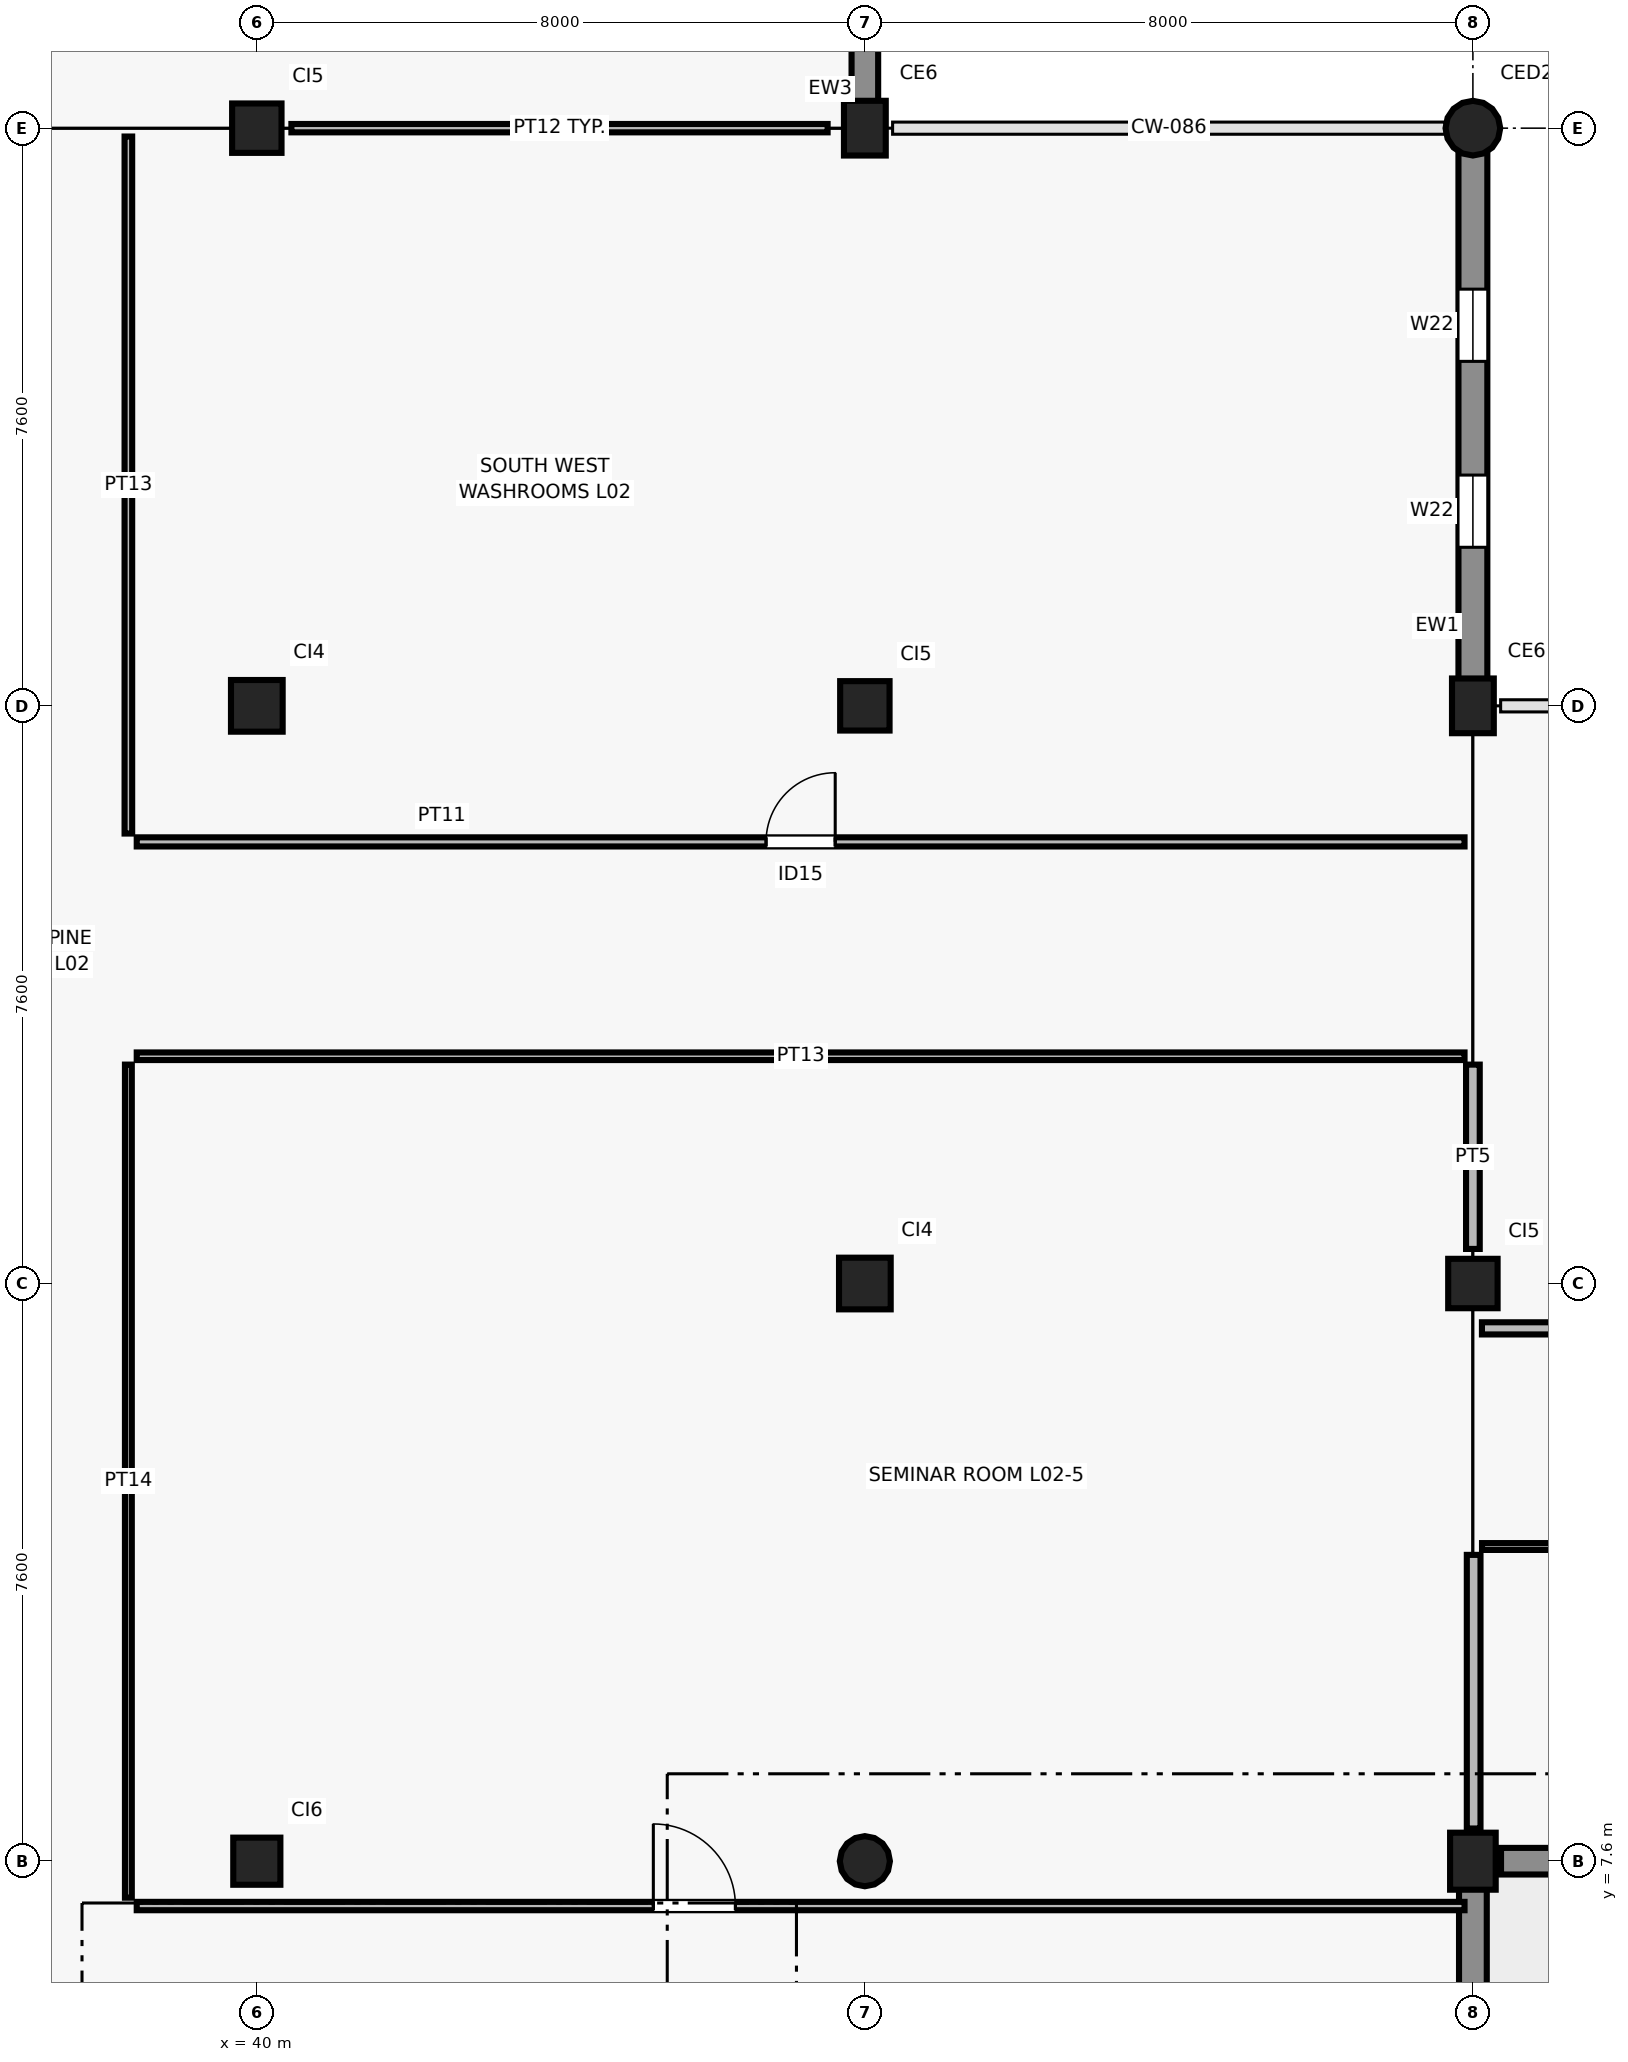
"""IFC4 building model, lengths in metres.
Left out: names, types, materials, properties, quantities, classifications, styles, units other than length and angle.
Written with IfcOpenShell. Run it as: python <this file> out.ifc"""

import sys

from ifc_helpers import new_model, si_unit, direction, frame, frame_2d, origin, origin_2d, place, context, subcontext, project, spatial, rectangle, circle, extrude, element, fill, save


model = new_model("IFC4")
c1 = context("Model", 3, precision=1e-05, world=origin(), true_north=direction((0.0, 1.0)))
c2 = subcontext(c1, "Body", "Model", "MODEL_VIEW")
j1 = project(units=[si_unit("LENGTHUNIT", "METRE"), si_unit("PLANEANGLEUNIT", "RADIAN")], contexts=[c1])
p1 = place(None, origin())
s1 = spatial("IfcSite", under=j1, at=p1, CompositionType="ELEMENT")
p2 = place(p1, origin())
s2 = spatial("IfcBuilding", under=s1, at=p2, CompositionType="ELEMENT")
p3 = place(p2, frame((0.0, 0.0, 9.0)))
s3 = spatial("IfcBuildingStorey", under=s2, at=p3, CompositionType="ELEMENT", Elevation=9.0)
p4 = place(p3, frame((40.0, 7.6, 0.0), z_axis=(0.0, 0.0, 1.0), x_axis=(1.0, 0.0, 0.0)))
e1 = element("IfcColumn", 1, at=p4, inside=s3, PredefinedType="COLUMN", context=c2, shape_type="SweptSolid", body=[
    extrude(rectangle(XDim=0.62, YDim=0.62, at=origin_2d()), origin(), (0.0, 0.0, 1.0), 4.2),
])
p5 = place(p3, frame((40.0, 22.8, 0.0), z_axis=(0.0, 0.0, 1.0), x_axis=(1.0, 0.0, 0.0)))
e2 = element("IfcColumn", 2, at=p5, inside=s3, PredefinedType="COLUMN", context=c2, shape_type="SweptSolid", body=[
    extrude(rectangle(XDim=0.68, YDim=0.68, at=origin_2d()), origin(), (0.0, 0.0, 1.0), 4.2),
])
p6 = place(p3, frame((40.0, 30.4, 0.0), z_axis=(0.0, 0.0, 1.0), x_axis=(1.0, 0.0, 0.0)))
e3 = element("IfcColumn", 3, at=p6, inside=s3, PredefinedType="COLUMN", context=c2, shape_type="SweptSolid", body=[
    extrude(rectangle(XDim=0.65, YDim=0.65, at=origin_2d()), origin(), (0.0, 0.0, 1.0), 4.2),
])
p7 = place(p3, frame((48.0, 7.6, 0.0), z_axis=(0.0, 0.0, 1.0), x_axis=(1.0, 0.0, 0.0)))
e4 = element("IfcColumn", 4, at=p7, inside=s3, PredefinedType="COLUMN", context=c2, shape_type="SweptSolid", body=[
    extrude(circle(Radius=0.33, at=origin_2d()), origin(), (0.0, 0.0, 1.0), 4.2),
])
p8 = place(p3, frame((48.0, 15.2, 0.0), z_axis=(0.0, 0.0, 1.0), x_axis=(1.0, 0.0, 0.0)))
e5 = element("IfcColumn", 5, at=p8, inside=s3, PredefinedType="COLUMN", context=c2, shape_type="SweptSolid", body=[
    extrude(rectangle(XDim=0.68, YDim=0.68, at=origin_2d()), origin(), (0.0, 0.0, 1.0), 4.2),
])
p9 = place(p3, frame((48.0, 22.8, 0.0), z_axis=(0.0, 0.0, 1.0), x_axis=(1.0, 0.0, 0.0)))
e6 = element("IfcColumn", 6, at=p9, inside=s3, PredefinedType="COLUMN", context=c2, shape_type="SweptSolid", body=[
    extrude(rectangle(XDim=0.65, YDim=0.65, at=origin_2d()), origin(), (0.0, 0.0, 1.0), 4.2),
])
p10 = place(p3, frame((48.0, 30.4, 0.0), z_axis=(0.0, 0.0, 1.0), x_axis=(1.0, 0.0, 0.0)))
e7 = element("IfcColumn", 7, at=p10, inside=s3, PredefinedType="COLUMN", context=c2, shape_type="SweptSolid", body=[
    extrude(rectangle(XDim=0.72, YDim=0.55, at=origin_2d()), origin(), (0.0, 0.0, 1.0), 4.2),
])
p11 = place(p3, frame((56.0, 7.6, 0.0), z_axis=(0.0, 0.0, 1.0), x_axis=(1.0, 0.0, 0.0)))
e8 = element("IfcColumn", 8, at=p11, inside=s3, PredefinedType="COLUMN", context=c2, shape_type="SweptSolid", body=[
    extrude(rectangle(XDim=0.75, YDim=0.6, at=origin_2d()), origin(), (0.0, 0.0, 1.0), 4.2),
])
p12 = place(p3, frame((56.0, 15.2, 0.0), z_axis=(0.0, 0.0, 1.0), x_axis=(1.0, 0.0, 0.0)))
e9 = element("IfcColumn", 9, at=p12, inside=s3, PredefinedType="COLUMN", context=c2, shape_type="SweptSolid", body=[
    extrude(rectangle(XDim=0.65, YDim=0.65, at=origin_2d()), origin(), (0.0, 0.0, 1.0), 4.2),
])
p13 = place(p3, frame((56.0, 22.8, 0.0), z_axis=(0.0, 0.0, 1.0), x_axis=(1.0, 0.0, 0.0)))
e10 = element("IfcColumn", 10, at=p13, inside=s3, PredefinedType="COLUMN", context=c2, shape_type="SweptSolid", body=[
    extrude(rectangle(XDim=0.72, YDim=0.55, at=origin_2d()), origin(), (0.0, 0.0, 1.0), 4.2),
])
p14 = place(p3, frame((56.0, 30.4, 0.0), z_axis=(0.0, 0.0, 1.0), x_axis=(1.0, 0.0, 0.0)))
e11 = element("IfcColumn", 11, at=p14, inside=s3, PredefinedType="COLUMN", context=c2, shape_type="SweptSolid", body=[
    extrude(circle(Radius=0.36, at=origin_2d()), origin(), (0.0, 0.0, 1.0), 4.2),
])
p15 = place(p3, frame((56.0, 0.302, 0.0), z_axis=(0.0, 0.0, 1.0), x_axis=(0.0, 1.0, 0.0)))
e12 = element("IfcWall", 12, at=p15, inside=s3, PredefinedType="SOLIDWALL", context=c2, shape_type="SweptSolid", body=[
    extrude(rectangle(XDim=7.002, YDim=0.365, at=frame_2d((3.501, 0.0))), origin(), (0.0, 0.0, 1.0), 3.92),
])
p16 = place(p3, frame((56.37, 7.6, 0.0), z_axis=(0.0, 0.0, 1.0), x_axis=(1.0, 0.0, 0.0)))
e13 = element("IfcWall", 13, at=p16, inside=s3, PredefinedType="SOLIDWALL", context=c2, shape_type="SweptSolid", body=[
    extrude(rectangle(XDim=7.26, YDim=0.35, at=frame_2d((3.63, 0.0))), origin(), (0.0, 0.0, 1.0), 3.27),
])
p17 = place(p16, frame((1.193, 0.0, 0.9)))
e14 = element("IfcOpeningElement", 14, at=p17, cuts=e13, PredefinedType="OPENING", context=c2, shape_type="SweptSolid", body=[
    extrude(rectangle(XDim=2.0, YDim=1.8, at=frame_2d((1.0, 0.9))), frame((0.0, 0.185, 0.0), z_axis=(0.0, -1.0, 0.0), x_axis=(1.0, 0.0, 0.0)), (0.0, 0.0, 1.0), 0.37),
])
p18 = place(p16, frame((4.067, 0.0, 0.9)))
e15 = element("IfcOpeningElement", 15, at=p18, cuts=e13, PredefinedType="OPENING", context=c2, shape_type="SweptSolid", body=[
    extrude(rectangle(XDim=2.0, YDim=1.8, at=frame_2d((1.0, 0.9))), frame((0.0, 0.185, 0.0), z_axis=(0.0, -1.0, 0.0), x_axis=(1.0, 0.0, 0.0)), (0.0, 0.0, 1.0), 0.37),
])
p19 = place(p3, frame((56.0, 23.07, 0.0), z_axis=(0.0, 0.0, 1.0), x_axis=(0.0, 1.0, 0.0)))
e16 = element("IfcWall", 16, at=p19, inside=s3, PredefinedType="SOLIDWALL", context=c2, shape_type="SweptSolid", body=[
    extrude(rectangle(XDim=7.028, YDim=0.38, at=frame_2d((3.514, 0.0))), origin(), (0.0, 0.0, 1.0), 3.3),
])
p20 = place(p19, frame((1.816, 0.0, 0.9)))
e17 = element("IfcOpeningElement", 17, at=p20, cuts=e16, PredefinedType="OPENING", context=c2, shape_type="SweptSolid", body=[
    extrude(rectangle(XDim=0.95, YDim=1.25, at=frame_2d((0.475, 0.625))), frame((0.0, 0.2, 0.0), z_axis=(0.0, -1.0, 0.0), x_axis=(1.0, 0.0, 0.0)), (0.0, 0.0, 1.0), 0.4),
])
p21 = place(p19, frame((4.262, 0.0, 0.9)))
e18 = element("IfcOpeningElement", 18, at=p21, cuts=e16, PredefinedType="OPENING", context=c2, shape_type="SweptSolid", body=[
    extrude(rectangle(XDim=0.95, YDim=1.25, at=frame_2d((0.475, 0.625))), frame((0.0, 0.2, 0.0), z_axis=(0.0, -1.0, 0.0), x_axis=(1.0, 0.0, 0.0)), (0.0, 0.0, 1.0), 0.4),
])
p22 = place(p3, frame((48.0, 30.67, 0.0), z_axis=(0.0, 0.0, 1.0), x_axis=(0.0, 1.0, 0.0)))
e19 = element("IfcWall", 19, at=p22, inside=s3, PredefinedType="SOLIDWALL", context=c2, shape_type="SweptSolid", body=[
    extrude(rectangle(XDim=7.135, YDim=0.35, at=frame_2d((3.567, 0.0))), origin(), (0.0, 0.0, 1.0), 3.4),
])
p23 = place(p22, frame((0.752, 0.0, 0.9)))
e20 = element("IfcOpeningElement", 20, at=p23, cuts=e19, PredefinedType="OPENING", context=c2, shape_type="SweptSolid", body=[
    extrude(rectangle(XDim=2.6, YDim=1.65, at=frame_2d((1.3, 0.825))), frame((0.0, 0.185, 0.0), z_axis=(0.0, -1.0, 0.0), x_axis=(1.0, 0.0, 0.0)), (0.0, 0.0, 1.0), 0.37),
])
p24 = place(p22, frame((3.783, 0.0, 0.9)))
e21 = element("IfcOpeningElement", 21, at=p24, cuts=e19, PredefinedType="OPENING", context=c2, shape_type="SweptSolid", body=[
    extrude(rectangle(XDim=2.6, YDim=1.65, at=frame_2d((1.3, 0.825))), frame((0.0, 0.185, 0.0), z_axis=(0.0, -1.0, 0.0), x_axis=(1.0, 0.0, 0.0)), (0.0, 0.0, 1.0), 0.37),
])
p25 = place(p3, frame((38.42, 7.01, 0.0), z_axis=(0.0, 0.0, 1.0), x_axis=(1.0, 0.0, 0.0)))
e22 = element("IfcWall", 22, at=p25, inside=s3, PredefinedType="PARTITIONING", context=c2, shape_type="SweptSolid", body=[
    extrude(rectangle(XDim=17.47, YDim=0.11, at=frame_2d((8.735, 0.0))), origin(), (0.0, 0.0, 1.0), 3.9),
])
p26 = place(p25, frame((6.797, 0.0, 0.0)))
e23 = element("IfcOpeningElement", 23, at=p26, cuts=e22, PredefinedType="OPENING", context=c2, shape_type="SweptSolid", body=[
    extrude(rectangle(XDim=1.08, YDim=2.15, at=frame_2d((0.54, 1.075))), frame((0.0, 0.065, 0.0), z_axis=(0.0, -1.0, 0.0), x_axis=(1.0, 0.0, 0.0)), (0.0, 0.0, 1.0), 0.13),
])
p27 = place(p3, frame((38.42, 18.19, 0.0), z_axis=(0.0, 0.0, 1.0), x_axis=(1.0, 0.0, 0.0)))
e24 = element("IfcWall", 24, at=p27, inside=s3, PredefinedType="PARTITIONING", context=c2, shape_type="SweptSolid", body=[
    extrude(rectangle(XDim=17.47, YDim=0.1, at=frame_2d((8.735, 0.0))), origin(), (0.0, 0.0, 1.0), 3.9),
])
p28 = place(p3, frame((38.31, 7.12, 0.0), z_axis=(0.0, 0.0, 1.0), x_axis=(0.0, 1.0, 0.0)))
e25 = element("IfcWall", 25, at=p28, inside=s3, PredefinedType="PARTITIONING", context=c2, shape_type="SweptSolid", body=[
    extrude(rectangle(XDim=10.96, YDim=0.09, at=frame_2d((5.48, 0.0))), origin(), (0.0, 0.0, 1.0), 3.9),
])
p29 = place(p3, frame((56.0, 15.655, 0.0), z_axis=(0.0, 0.0, 1.0), x_axis=(0.0, 1.0, 0.0)))
e26 = element("IfcWall", 26, at=p29, inside=s3, PredefinedType="PARTITIONING", context=c2, shape_type="SweptSolid", body=[
    extrude(rectangle(XDim=2.425, YDim=0.18, at=frame_2d((1.212, 0.0))), origin(), (0.0, 0.0, 1.0), 3.3),
])
p30 = place(p3, frame((38.42, 21.01, 0.0), z_axis=(0.0, 0.0, 1.0), x_axis=(1.0, 0.0, 0.0)))
e27 = element("IfcWall", 27, at=p30, inside=s3, PredefinedType="PARTITIONING", context=c2, shape_type="SweptSolid", body=[
    extrude(rectangle(XDim=17.47, YDim=0.12, at=frame_2d((8.735, 0.0))), origin(), (0.0, 0.0, 1.0), 3.9),
])
p31 = place(p30, frame((8.28, 0.0, 0.0)))
e28 = element("IfcOpeningElement", 28, at=p31, cuts=e27, PredefinedType="OPENING", context=c2, shape_type="SweptSolid", body=[
    extrude(rectangle(XDim=0.91, YDim=2.1, at=frame_2d((0.455, 1.05))), frame((0.0, 0.07, 0.0), z_axis=(0.0, -1.0, 0.0), x_axis=(1.0, 0.0, 0.0)), (0.0, 0.0, 1.0), 0.14),
])
p32 = place(p3, frame((40.455, 30.4, 0.0), z_axis=(0.0, 0.0, 1.0), x_axis=(1.0, 0.0, 0.0)))
e29 = element("IfcWall", 29, at=p32, inside=s3, PredefinedType="PARTITIONING", context=c2, shape_type="SweptSolid", body=[
    extrude(rectangle(XDim=7.055, YDim=0.11, at=frame_2d((3.527, 0.0))), origin(), (0.0, 0.0, 1.0), 3.2),
])
p33 = place(p3, frame((38.31, 21.12, 0.0), z_axis=(0.0, 0.0, 1.0), x_axis=(0.0, 1.0, 0.0)))
e30 = element("IfcWall", 30, at=p33, inside=s3, PredefinedType="PARTITIONING", context=c2, shape_type="SweptSolid", body=[
    extrude(rectangle(XDim=9.17, YDim=0.1, at=frame_2d((4.585, 0.0))), origin(), (0.0, 0.0, 1.0), 3.9),
])
p34 = place(p3, frame((56.12, 11.74, 0.0), z_axis=(0.0, 0.0, 1.0), x_axis=(1.0, 0.0, 0.0)))
e31 = element("IfcWall", 31, at=p34, inside=s3, PredefinedType="PARTITIONING", context=c2, shape_type="SweptSolid", body=[
    extrude(rectangle(XDim=31.72, YDim=0.09, at=frame_2d((15.86, 0.0))), origin(), (0.0, 0.0, 1.0), 3.9),
])
p35 = place(p34, frame((15.36, 0.0, 0.0)))
e32 = element("IfcOpeningElement", 32, at=p35, cuts=e31, PredefinedType="OPENING", context=c2, shape_type="SweptSolid", body=[
    extrude(rectangle(XDim=1.0, YDim=2.15, at=frame_2d((0.5, 1.075))), frame((0.0, 0.055, 0.0), z_axis=(0.0, -1.0, 0.0), x_axis=(1.0, 0.0, 0.0)), (0.0, 0.0, 1.0), 0.11),
])
p36 = place(p3, frame((56.01, 8.03, 0.0), z_axis=(0.0, 0.0, 1.0), x_axis=(0.0, 1.0, 0.0)))
e33 = element("IfcWall", 33, at=p36, inside=s3, PredefinedType="PARTITIONING", context=c2, shape_type="SweptSolid", body=[
    extrude(rectangle(XDim=3.6, YDim=0.18, at=frame_2d((1.8, 0.0))), origin(), (0.0, 0.0, 1.0), 3.24),
])
p37 = place(p3, frame((56.119, 14.61, 0.0), z_axis=(0.0, 0.0, 1.0), x_axis=(1.0, 0.0, 0.0)))
e34 = element("IfcWall", 34, at=p37, inside=s3, PredefinedType="PARTITIONING", context=c2, shape_type="SweptSolid", body=[
    extrude(rectangle(XDim=27.771, YDim=0.16, at=frame_2d((13.885, 0.0))), origin(), (0.0, 0.0, 1.0), 3.9),
])
p38 = place(p37, frame((13.386, 0.0, 0.0)))
e35 = element("IfcOpeningElement", 35, at=p38, cuts=e34, PredefinedType="OPENING", context=c2, shape_type="SweptSolid", body=[
    extrude(rectangle(XDim=1.0, YDim=2.15, at=frame_2d((0.5, 1.075))), frame((0.0, 0.09, 0.0), z_axis=(0.0, -1.0, 0.0), x_axis=(1.0, 0.0, 0.0)), (0.0, 0.0, 1.0), 0.18),
])
p39 = place(p20, origin())
e36 = element("IfcWindow", 36, at=p39, inside=s3, PartitioningType="SINGLE_PANEL", PredefinedType="WINDOW", context=c2, shape_type="SweptSolid", body=[
    extrude(rectangle(XDim=0.95, YDim=1.25, at=frame_2d((0.475, 0.625))), frame((0.0, 0.03, 0.0), z_axis=(0.0, -1.0, 0.0), x_axis=(1.0, 0.0, 0.0)), (0.0, 0.0, 1.0), 0.06),
])
fill(e17, e36)
p40 = place(p21, origin())
e37 = element("IfcWindow", 37, at=p40, inside=s3, PartitioningType="SINGLE_PANEL", PredefinedType="WINDOW", context=c2, shape_type="SweptSolid", body=[
    extrude(rectangle(XDim=0.95, YDim=1.25, at=frame_2d((0.475, 0.625))), frame((0.0, 0.03, 0.0), z_axis=(0.0, -1.0, 0.0), x_axis=(1.0, 0.0, 0.0)), (0.0, 0.0, 1.0), 0.06),
])
fill(e18, e37)
p41 = place(p26, origin())
e38 = element("IfcDoor", 38, at=p41, inside=s3, OperationType="SINGLE_SWING_LEFT", PredefinedType="DOOR", context=c2, shape_type="SweptSolid", body=[
    extrude(rectangle(XDim=1.08, YDim=2.15, at=frame_2d((0.54, 1.075))), frame((0.0, 0.025, 0.0), z_axis=(0.0, -1.0, 0.0), x_axis=(1.0, 0.0, 0.0)), (0.0, 0.0, 1.0), 0.05),
])
fill(e23, e38)
p42 = place(p31, origin())
e39 = element("IfcDoor", 39, at=p42, inside=s3, OperationType="SINGLE_SWING_RIGHT", PredefinedType="DOOR", context=c2, shape_type="SweptSolid", body=[
    extrude(rectangle(XDim=0.91, YDim=2.1, at=frame_2d((0.455, 1.05))), frame((0.0, 0.025, 0.0), z_axis=(0.0, -1.0, 0.0), x_axis=(1.0, 0.0, 0.0)), (0.0, 0.0, 1.0), 0.05),
])
fill(e28, e39)
save(model, sys.argv[1])
